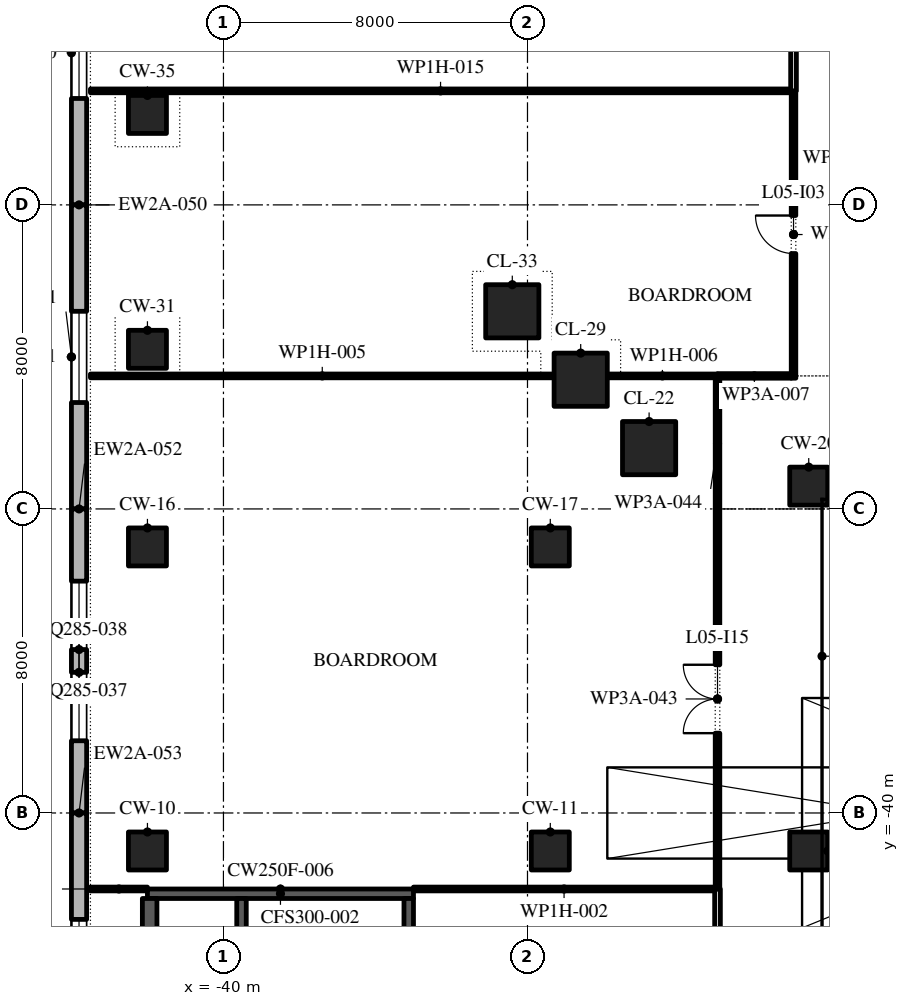
"""IFC4 building model, lengths in metres.
Left out: names, types, materials, properties, quantities, classifications, styles, units other than length and angle.
Written with IfcOpenShell. Run it as: python <this file> out.ifc"""

import sys

from ifc_helpers import new_model, si_unit, direction, frame, frame_2d, origin, origin_2d, place, context, subcontext, project, spatial, polyline, rectangle, outline, extrude, element, fill, save


model = new_model("IFC4")
c1 = context("Model", 3, precision=1e-05, world=origin(), true_north=direction((0.0, 1.0)))
c2 = subcontext(c1, "Body", "Model", "MODEL_VIEW")
j1 = project(units=[si_unit("LENGTHUNIT", "METRE"), si_unit("PLANEANGLEUNIT", "RADIAN")], contexts=[c1])
p1 = place(None, origin())
s1 = spatial("IfcSite", under=j1, at=p1, CompositionType="ELEMENT")
p2 = place(p1, origin())
s2 = spatial("IfcBuilding", under=s1, at=p2, CompositionType="ELEMENT")
p3 = place(p2, frame((0.0, 0.0, 28.8)))
s3 = spatial("IfcBuildingStorey", under=s2, at=p3, CompositionType="ELEMENT", Elevation=28.8)
for number, where, z_axis, x_axis in (
    (1, (-42.0, -41.0, 0.0), (0.0, 0.0, 1.0), (1.0, 0.0, 0.0)),
    (2, (-31.4, -41.0, 0.0), (0.0, 0.0, 1.0), (1.0, 0.0, 0.0)),
    (3, (-24.6, -41.0, 0.0), (0.0, 0.0, 1.0), (1.0, 0.0, 0.0)),
    (4, (-42.0, -33.0, 0.0), (0.0, 0.0, 1.0), (1.0, 0.0, 0.0)),
    (5, (-31.4, -33.0, 0.0), (0.0, 0.0, 1.0), (1.0, 0.0, 0.0)),
    (6, (-24.6, -31.4, 0.0), (0.0, 0.0, 1.0), (1.0, 0.0, 0.0)),
):
    element("IfcColumn", number, at=place(p3, frame(where, z_axis=z_axis, x_axis=x_axis)), inside=s3, PredefinedType="COLUMN", context=c2, shape_type="SweptSolid", body=[
        extrude(rectangle(XDim=1.0, YDim=1.0, at=origin_2d()), origin(), (0.0, 0.0, 1.0), 4.35),
    ])
for number, where, z_axis, x_axis in (
    (7, (-28.8, -30.4, 0.0), (0.0, 0.0, 1.0), (1.0, 0.0, 0.0)),
    (8, (-30.6, -28.6, 0.0), (0.0, 0.0, 1.0), (1.0, 0.0, 0.0)),
):
    element("IfcColumn", number, at=place(p3, frame(where, z_axis=z_axis, x_axis=x_axis)), inside=s3, PredefinedType="COLUMN", context=c2, shape_type="SweptSolid", body=[
        extrude(rectangle(XDim=1.4, YDim=1.4, at=origin_2d()), origin(), (0.0, 0.0, 1.0), 4.8),
    ])
p4 = place(p3, frame((-42.0, -27.8, 0.0), z_axis=(0.0, 0.0, 1.0), x_axis=(1.0, 0.0, 0.0)))
e9 = element("IfcColumn", 9, at=p4, inside=s3, PredefinedType="COLUMN", context=c2, shape_type="SweptSolid", body=[
    extrude(rectangle(XDim=1.0, YDim=1.0, at=origin_2d()), origin(), (0.0, 0.0, 1.0), 4.35),
])
p5 = place(p3, frame((-32.4, -26.8, 0.0), z_axis=(0.0, 0.0, 1.0), x_axis=(1.0, 0.0, 0.0)))
e10 = element("IfcColumn", 10, at=p5, inside=s3, PredefinedType="COLUMN", context=c2, shape_type="SweptSolid", body=[
    extrude(rectangle(XDim=1.4, YDim=1.4, at=origin_2d()), origin(), (0.0, 0.0, 1.0), 4.8),
])
p6 = place(p3, frame((-42.0, -21.62, 0.0), z_axis=(0.0, 0.0, 1.0), x_axis=(1.0, 0.0, 0.0)))
e11 = element("IfcColumn", 11, at=p6, inside=s3, PredefinedType="COLUMN", context=c2, shape_type="SweptSolid", body=[
    extrude(rectangle(XDim=1.0, YDim=1.0, at=origin_2d()), origin(), (0.0, 0.0, 1.0), 4.35),
])
p7 = place(p3, frame((-43.8, -16.0, 0.0), z_axis=(0.0, 0.0, 1.0), x_axis=(0.0, -1.0, 0.0)))
e12 = element("IfcWall", 12, at=p7, inside=s3, PredefinedType="STANDARD", context=c2, shape_type="SweptSolid", body=[
    extrude(rectangle(XDim=8.0, YDim=0.4, at=frame_2d((4.0, 0.0))), origin(), (0.0, 0.0, 1.0), 4.35),
])
p8 = place(p7, frame((2.8, 0.0, 0.9)))
e13 = element("IfcOpeningElement", 13, at=p8, cuts=e12, PredefinedType="OPENING", context=c2, shape_type="SweptSolid", body=[
    extrude(outline(polyline([(0.0, 0.0), (2.4, 0.0), (2.4, 1.425), (2.378, 1.677), (2.312, 1.921), (2.205, 2.15), (2.06, 2.356), (1.881, 2.535), (1.674, 2.679), (1.444, 2.785), (1.2, 2.85), (0.956, 2.785), (0.726, 2.679), (0.519, 2.535), (0.34, 2.356), (0.195, 2.15), (0.088, 1.921), (0.022, 1.677), (0.0, 1.425), (0.0, 0.0)])), frame((0.0, 0.21, 0.0), z_axis=(0.0, -1.0, 0.0), x_axis=(1.0, 0.0, 0.0)), (0.0, 0.0, 1.0), 0.42),
])
p9 = place(p3, frame((-43.8, -24.0, 0.0), z_axis=(0.0, 0.0, 1.0), x_axis=(0.0, -1.0, 0.0)))
e14 = element("IfcWall", 14, at=p9, inside=s3, PredefinedType="STANDARD", context=c2, shape_type="SweptSolid", body=[
    extrude(rectangle(XDim=8.0, YDim=0.4, at=frame_2d((4.0, 0.0))), origin(), (0.0, 0.0, 1.0), 4.35),
])
p10 = place(p9, frame((2.8, 0.0, 0.9)))
e15 = element("IfcOpeningElement", 15, at=p10, cuts=e14, PredefinedType="OPENING", context=c2, shape_type="SweptSolid", body=[
    extrude(outline(polyline([(0.0, 0.0), (2.4, 0.0), (2.4, 1.425), (2.378, 1.677), (2.312, 1.921), (2.205, 2.15), (2.06, 2.356), (1.881, 2.535), (1.674, 2.679), (1.444, 2.785), (1.2, 2.85), (0.956, 2.785), (0.726, 2.679), (0.519, 2.535), (0.34, 2.356), (0.195, 2.15), (0.088, 1.921), (0.022, 1.677), (0.0, 1.425), (0.0, 0.0)])), frame((0.0, 0.21, 0.0), z_axis=(0.0, -1.0, 0.0), x_axis=(1.0, 0.0, 0.0)), (0.0, 0.0, 1.0), 0.42),
])
p11 = place(p3, frame((-43.8, -32.0, 0.0), z_axis=(0.0, 0.0, 1.0), x_axis=(0.0, -1.0, 0.0)))
e16 = element("IfcWall", 16, at=p11, inside=s3, PredefinedType="STANDARD", context=c2, shape_type="SweptSolid", body=[
    extrude(rectangle(XDim=8.0, YDim=0.4, at=frame_2d((4.0, 0.0))), origin(), (0.0, 0.0, 1.0), 4.35),
])
p12 = place(p11, frame((1.9, 0.0, 0.9)))
e17 = element("IfcOpeningElement", 17, at=p12, cuts=e16, PredefinedType="OPENING", context=c2, shape_type="SweptSolid", body=[
    extrude(outline(polyline([(0.0, 0.0), (1.8, 0.0), (1.8, 1.425), (1.784, 1.646), (1.738, 1.864), (1.661, 2.072), (1.556, 2.268), (1.425, 2.447), (1.269, 2.605), (1.093, 2.741), (0.9, 2.85), (0.707, 2.741), (0.531, 2.605), (0.375, 2.447), (0.244, 2.268), (0.139, 2.072), (0.062, 1.864), (0.016, 1.646), (0.0, 1.425), (0.0, 0.0)])), frame((0.0, 0.21, 0.0), z_axis=(0.0, -1.0, 0.0), x_axis=(1.0, 0.0, 0.0)), (0.0, 0.0, 1.0), 0.42),
])
p13 = place(p11, frame((4.3, 0.0, 0.9)))
e18 = element("IfcOpeningElement", 18, at=p13, cuts=e16, PredefinedType="OPENING", context=c2, shape_type="SweptSolid", body=[
    extrude(outline(polyline([(0.0, 0.0), (1.8, 0.0), (1.8, 1.425), (1.784, 1.646), (1.738, 1.864), (1.661, 2.072), (1.556, 2.268), (1.425, 2.447), (1.269, 2.605), (1.093, 2.741), (0.9, 2.85), (0.707, 2.741), (0.531, 2.605), (0.375, 2.447), (0.244, 2.268), (0.139, 2.072), (0.062, 1.864), (0.016, 1.646), (0.0, 1.425), (0.0, 0.0)])), frame((0.0, 0.21, 0.0), z_axis=(0.0, -1.0, 0.0), x_axis=(1.0, 0.0, 0.0)), (0.0, 0.0, 1.0), 0.42),
])
p14 = place(p3, frame((-43.8, -40.0, 0.0), z_axis=(0.0, 0.0, 1.0), x_axis=(0.0, -1.0, 0.0)))
e19 = element("IfcWall", 19, at=p14, inside=s3, PredefinedType="STANDARD", context=c2, shape_type="SweptSolid", body=[
    extrude(rectangle(XDim=8.0, YDim=0.4, at=frame_2d((4.0, 0.0))), origin(), (0.0, 0.0, 1.0), 4.35),
])
p15 = place(p14, frame((2.8, 0.0, 0.9)))
e20 = element("IfcOpeningElement", 20, at=p15, cuts=e19, PredefinedType="OPENING", context=c2, shape_type="SweptSolid", body=[
    extrude(outline(polyline([(0.0, 0.0), (2.4, 0.0), (2.4, 1.425), (2.378, 1.677), (2.312, 1.921), (2.205, 2.15), (2.06, 2.356), (1.881, 2.535), (1.674, 2.679), (1.444, 2.785), (1.2, 2.85), (0.956, 2.785), (0.726, 2.679), (0.519, 2.535), (0.34, 2.356), (0.195, 2.15), (0.088, 1.921), (0.022, 1.677), (0.0, 1.425), (0.0, 0.0)])), frame((0.0, 0.21, 0.0), z_axis=(0.0, -1.0, 0.0), x_axis=(1.0, 0.0, 0.0)), (0.0, 0.0, 1.0), 0.42),
])
p16 = place(p3, frame((-42.0, -42.125, 0.0), z_axis=(0.0, 0.0, 1.0), x_axis=(1.0, 0.0, 0.0)))
e21 = element("IfcWall", 21, at=p16, inside=s3, PredefinedType="SHEAR", context=c2, shape_type="SweptSolid", body=[
    extrude(rectangle(XDim=7.0, YDim=0.25, at=frame_2d((3.5, 0.0))), origin(), (0.0, 0.0, 1.0), 4.35),
])
p17 = place(p3, frame((-41.942, -49.5, 0.0), z_axis=(0.0, 0.0, 1.0), x_axis=(0.0, 1.0, 0.0)))
e22 = element("IfcWall", 22, at=p17, inside=s3, PredefinedType="SHEAR", context=c2, shape_type="SweptSolid", body=[
    extrude(rectangle(XDim=7.25, YDim=0.384, at=frame_2d((3.625, 0.0))), origin(), (0.0, 0.0, 1.0), 4.35),
])
p18 = place(p17, frame((3.05, 0.0, 0.0)))
e23 = element("IfcOpeningElement", 23, at=p18, cuts=e22, PredefinedType="OPENING", context=c2, shape_type="SweptSolid", body=[
    extrude(rectangle(XDim=0.9, YDim=2.1, at=frame_2d((0.45, 1.05))), frame((0.0, 0.202, 0.0), z_axis=(0.0, -1.0, 0.0), x_axis=(1.0, 0.0, 0.0)), (0.0, 0.0, 1.0), 0.404),
])
p19 = place(p3, frame((-35.125, -49.75, 0.0), z_axis=(0.0, 0.0, 1.0), x_axis=(0.0, 1.0, 0.0)))
e24 = element("IfcWall", 24, at=p19, inside=s3, PredefinedType="SHEAR", context=c2, shape_type="SweptSolid", body=[
    extrude(rectangle(XDim=7.5, YDim=0.25, at=frame_2d((3.75, 0.0))), origin(), (0.0, 0.0, 1.0), 4.35),
])
p20 = place(p19, frame((0.6, 0.0, 0.0)))
e25 = element("IfcOpeningElement", 25, at=p20, cuts=e24, PredefinedType="OPENING", context=c2, shape_type="SweptSolid", body=[
    extrude(rectangle(XDim=1.2, YDim=2.1, at=frame_2d((0.6, 1.05))), frame((0.0, 0.135, 0.0), z_axis=(0.0, -1.0, 0.0), x_axis=(1.0, 0.0, 0.0)), (0.0, 0.0, 1.0), 0.27),
])
p21 = place(p3, frame((-39.525, -49.75, 0.0), z_axis=(0.0, 0.0, 1.0), x_axis=(0.0, 1.0, 0.0)))
e26 = element("IfcWall", 26, at=p21, inside=s3, PredefinedType="SHEAR", context=c2, shape_type="SweptSolid", body=[
    extrude(rectangle(XDim=7.5, YDim=0.25, at=frame_2d((3.75, 0.0))), origin(), (0.0, 0.0, 1.0), 4.35),
])
p22 = place(p3, frame((-43.5, -42.0, 0.0), z_axis=(0.0, 0.0, 1.0), x_axis=(1.0, 0.0, 0.0)))
e27 = element("IfcWall", 27, at=p22, inside=s3, PredefinedType="PARTITIONING", context=c2, shape_type="SweptSolid", body=[
    extrude(rectangle(XDim=1.5, YDim=0.1, at=frame_2d((0.75, 0.0))), origin(), (0.0, 0.0, 1.0), 4.35),
])
p23 = place(p3, frame((-35.0, -42.0, 0.0), z_axis=(0.0, 0.0, 1.0), x_axis=(1.0, 0.0, 0.0)))
e28 = element("IfcWall", 28, at=p23, inside=s3, PredefinedType="PARTITIONING", context=c2, shape_type="SweptSolid", body=[
    extrude(rectangle(XDim=7.925, YDim=0.1, at=frame_2d((3.962, 0.0))), origin(), (0.0, 0.0, 1.0), 4.35),
])
p24 = place(p3, frame((-43.5, -28.5, 0.0), z_axis=(0.0, 0.0, 1.0), x_axis=(1.0, 0.0, 0.0)))
e29 = element("IfcWall", 29, at=p24, inside=s3, PredefinedType="PARTITIONING", context=c2, shape_type="SweptSolid", body=[
    extrude(rectangle(XDim=12.2, YDim=0.1, at=frame_2d((6.1, 0.0))), origin(), (0.0, 0.0, 1.0), 4.35),
])
p25 = place(p3, frame((-29.9, -28.5, 0.0), z_axis=(0.0, 0.0, 1.0), x_axis=(1.0, 0.0, 0.0)))
e30 = element("IfcWall", 30, at=p25, inside=s3, PredefinedType="PARTITIONING", context=c2, shape_type="SweptSolid", body=[
    extrude(rectangle(XDim=2.9, YDim=0.1, at=frame_2d((1.45, 0.0))), origin(), (0.0, 0.0, 1.0), 4.35),
])
p26 = place(p3, frame((-27.0, -28.5, 0.0), z_axis=(0.0, 0.0, 1.0), x_axis=(1.0, 0.0, 0.0)))
e31 = element("IfcWall", 31, at=p26, inside=s3, PredefinedType="PARTITIONING", context=c2, shape_type="SweptSolid", body=[
    extrude(rectangle(XDim=1.94, YDim=0.12, at=frame_2d((0.97, 0.0))), origin(), (0.0, 0.0, 1.0), 4.35),
])
p27 = place(p3, frame((-43.5, -21.0, 0.0), z_axis=(0.0, 0.0, 1.0), x_axis=(1.0, 0.0, 0.0)))
e32 = element("IfcWall", 32, at=p27, inside=s3, PredefinedType="PARTITIONING", context=c2, shape_type="SweptSolid", body=[
    extrude(rectangle(XDim=18.425, YDim=0.1, at=frame_2d((9.212, 0.0))), origin(), (0.0, 0.0, 1.0), 4.35),
])
p28 = place(p3, frame((-27.0, -48.0, 0.0), z_axis=(0.0, 0.0, 1.0), x_axis=(0.0, 1.0, 0.0)))
e33 = element("IfcWall", 33, at=p28, inside=s3, PredefinedType="PARTITIONING", context=c2, shape_type="SweptSolid", body=[
    extrude(rectangle(XDim=6.0, YDim=0.15, at=frame_2d((3.0, 0.0))), origin(), (0.0, 0.0, 1.0), 4.35),
])
p29 = place(p28, frame((2.5, 0.0, 0.0)))
e34 = element("IfcOpeningElement", 34, at=p29, cuts=e33, PredefinedType="OPENING", context=c2, shape_type="SweptSolid", body=[
    extrude(rectangle(XDim=1.0, YDim=2.1, at=frame_2d((0.5, 1.05))), frame((0.0, 0.085, 0.0), z_axis=(0.0, -1.0, 0.0), x_axis=(1.0, 0.0, 0.0)), (0.0, 0.0, 1.0), 0.17),
])
p30 = place(p3, frame((-27.0, -42.0, 0.0), z_axis=(0.0, 0.0, 1.0), x_axis=(0.0, 1.0, 0.0)))
e35 = element("IfcWall", 35, at=p30, inside=s3, PredefinedType="PARTITIONING", context=c2, shape_type="SweptSolid", body=[
    extrude(rectangle(XDim=10.0, YDim=0.12, at=frame_2d((5.0, 0.0))), origin(), (0.0, 0.0, 1.0), 4.35),
])
p31 = place(p30, frame((4.1, 0.0, 0.0)))
e36 = element("IfcOpeningElement", 36, at=p31, cuts=e35, PredefinedType="OPENING", context=c2, shape_type="SweptSolid", body=[
    extrude(rectangle(XDim=1.8, YDim=2.1, at=frame_2d((0.9, 1.05))), frame((0.0, 0.07, 0.0), z_axis=(0.0, -1.0, 0.0), x_axis=(1.0, 0.0, 0.0)), (0.0, 0.0, 1.0), 0.14),
])
p32 = place(p3, frame((-27.0, -32.0, 0.0), z_axis=(0.0, 0.0, 1.0), x_axis=(0.0, 1.0, 0.0)))
e37 = element("IfcWall", 37, at=p32, inside=s3, PredefinedType="PARTITIONING", context=c2, shape_type="SweptSolid", body=[
    extrude(rectangle(XDim=3.44, YDim=0.12, at=frame_2d((1.72, 0.0))), origin(), (0.0, 0.0, 1.0), 4.35),
])
p33 = place(p3, frame((-25.0, -28.56, 0.0), z_axis=(0.0, 0.0, 1.0), x_axis=(0.0, 1.0, 0.0)))
e38 = element("IfcWall", 38, at=p33, inside=s3, PredefinedType="PARTITIONING", context=c2, shape_type="SweptSolid", body=[
    extrude(rectangle(XDim=7.56, YDim=0.12, at=frame_2d((3.78, 0.0))), origin(), (0.0, 0.0, 1.0), 4.35),
])
p34 = place(p33, frame((3.28, 0.0, 0.0)))
e39 = element("IfcOpeningElement", 39, at=p34, cuts=e38, PredefinedType="OPENING", context=c2, shape_type="SweptSolid", body=[
    extrude(rectangle(XDim=1.0, YDim=2.1, at=frame_2d((0.5, 1.05))), frame((0.0, 0.07, 0.0), z_axis=(0.0, -1.0, 0.0), x_axis=(1.0, 0.0, 0.0)), (0.0, 0.0, 1.0), 0.14),
])
p35 = place(p3, frame((-25.0, -21.0, 0.0), z_axis=(0.0, 0.0, 1.0), x_axis=(0.0, 1.0, 0.0)))
e40 = element("IfcWall", 40, at=p35, inside=s3, PredefinedType="PARTITIONING", context=c2, shape_type="SweptSolid", body=[
    extrude(rectangle(XDim=10.0, YDim=0.15, at=frame_2d((5.0, 0.0))), origin(), (0.0, 0.0, 1.0), 4.35),
])
p36 = place(p35, frame((4.1, 0.0, 0.0)))
e41 = element("IfcOpeningElement", 41, at=p36, cuts=e40, PredefinedType="OPENING", context=c2, shape_type="SweptSolid", body=[
    extrude(rectangle(XDim=1.8, YDim=2.1, at=frame_2d((0.9, 1.05))), frame((0.0, 0.085, 0.0), z_axis=(0.0, -1.0, 0.0), x_axis=(1.0, 0.0, 0.0)), (0.0, 0.0, 1.0), 0.17),
])
p37 = place(p8, origin())
e42 = element("IfcWindow", 42, at=p37, inside=s3, PartitioningType="DOUBLE_PANEL_VERTICAL", PredefinedType="WINDOW", context=c2, shape_type="SweptSolid", body=[
    extrude(outline(polyline([(0.0, 0.0), (2.4, 0.0), (2.4, 1.425), (2.378, 1.677), (2.312, 1.921), (2.205, 2.15), (2.06, 2.356), (1.881, 2.535), (1.674, 2.679), (1.444, 2.785), (1.2, 2.85), (0.956, 2.785), (0.726, 2.679), (0.519, 2.535), (0.34, 2.356), (0.195, 2.15), (0.088, 1.921), (0.022, 1.677), (0.0, 1.425), (0.0, 0.0)])), frame((0.0, 0.03, 0.0), z_axis=(0.0, -1.0, 0.0), x_axis=(1.0, 0.0, 0.0)), (0.0, 0.0, 1.0), 0.06),
])
fill(e13, e42)
p38 = place(p10, origin())
e43 = element("IfcWindow", 43, at=p38, inside=s3, PartitioningType="DOUBLE_PANEL_VERTICAL", PredefinedType="WINDOW", context=c2, shape_type="SweptSolid", body=[
    extrude(outline(polyline([(0.0, 0.0), (2.4, 0.0), (2.4, 1.425), (2.378, 1.677), (2.312, 1.921), (2.205, 2.15), (2.06, 2.356), (1.881, 2.535), (1.674, 2.679), (1.444, 2.785), (1.2, 2.85), (0.956, 2.785), (0.726, 2.679), (0.519, 2.535), (0.34, 2.356), (0.195, 2.15), (0.088, 1.921), (0.022, 1.677), (0.0, 1.425), (0.0, 0.0)])), frame((0.0, 0.03, 0.0), z_axis=(0.0, -1.0, 0.0), x_axis=(1.0, 0.0, 0.0)), (0.0, 0.0, 1.0), 0.06),
])
fill(e15, e43)
p39 = place(p12, origin())
e44 = element("IfcWindow", 44, at=p39, inside=s3, PartitioningType="DOUBLE_PANEL_VERTICAL", PredefinedType="WINDOW", context=c2, shape_type="SweptSolid", body=[
    extrude(outline(polyline([(0.0, 0.0), (1.8, 0.0), (1.8, 1.425), (1.784, 1.646), (1.738, 1.864), (1.661, 2.072), (1.556, 2.268), (1.425, 2.447), (1.269, 2.605), (1.093, 2.741), (0.9, 2.85), (0.707, 2.741), (0.531, 2.605), (0.375, 2.447), (0.244, 2.268), (0.139, 2.072), (0.062, 1.864), (0.016, 1.646), (0.0, 1.425), (0.0, 0.0)])), frame((0.0, 0.03, 0.0), z_axis=(0.0, -1.0, 0.0), x_axis=(1.0, 0.0, 0.0)), (0.0, 0.0, 1.0), 0.06),
])
fill(e17, e44)
p40 = place(p13, origin())
e45 = element("IfcWindow", 45, at=p40, inside=s3, PartitioningType="DOUBLE_PANEL_VERTICAL", PredefinedType="WINDOW", context=c2, shape_type="SweptSolid", body=[
    extrude(outline(polyline([(0.0, 0.0), (1.8, 0.0), (1.8, 1.425), (1.784, 1.646), (1.738, 1.864), (1.661, 2.072), (1.556, 2.268), (1.425, 2.447), (1.269, 2.605), (1.093, 2.741), (0.9, 2.85), (0.707, 2.741), (0.531, 2.605), (0.375, 2.447), (0.244, 2.268), (0.139, 2.072), (0.062, 1.864), (0.016, 1.646), (0.0, 1.425), (0.0, 0.0)])), frame((0.0, 0.03, 0.0), z_axis=(0.0, -1.0, 0.0), x_axis=(1.0, 0.0, 0.0)), (0.0, 0.0, 1.0), 0.06),
])
fill(e18, e45)
p41 = place(p15, origin())
e46 = element("IfcWindow", 46, at=p41, inside=s3, PartitioningType="DOUBLE_PANEL_VERTICAL", PredefinedType="WINDOW", context=c2, shape_type="SweptSolid", body=[
    extrude(outline(polyline([(0.0, 0.0), (2.4, 0.0), (2.4, 1.425), (2.378, 1.677), (2.312, 1.921), (2.205, 2.15), (2.06, 2.356), (1.881, 2.535), (1.674, 2.679), (1.444, 2.785), (1.2, 2.85), (0.956, 2.785), (0.726, 2.679), (0.519, 2.535), (0.34, 2.356), (0.195, 2.15), (0.088, 1.921), (0.022, 1.677), (0.0, 1.425), (0.0, 0.0)])), frame((0.0, 0.03, 0.0), z_axis=(0.0, -1.0, 0.0), x_axis=(1.0, 0.0, 0.0)), (0.0, 0.0, 1.0), 0.06),
])
fill(e20, e46)
p42 = place(p34, origin())
e47 = element("IfcDoor", 47, at=p42, inside=s3, OperationType="SINGLE_SWING_LEFT", PredefinedType="DOOR", context=c2, shape_type="SweptSolid", body=[
    extrude(rectangle(XDim=1.0, YDim=2.1, at=frame_2d((0.5, 1.05))), frame((0.0, 0.025, 0.0), z_axis=(0.0, -1.0, 0.0), x_axis=(1.0, 0.0, 0.0)), (0.0, 0.0, 1.0), 0.05),
])
fill(e39, e47)
p43 = place(p31, origin())
e48 = element("IfcDoor", 48, at=p43, inside=s3, OperationType="SINGLE_SWING_LEFT", PredefinedType="DOOR", context=c2, shape_type="SweptSolid", body=[
    extrude(rectangle(XDim=1.8, YDim=2.1, at=frame_2d((0.9, 1.05))), frame((0.0, 0.025, 0.0), z_axis=(0.0, -1.0, 0.0), x_axis=(1.0, 0.0, 0.0)), (0.0, 0.0, 1.0), 0.05),
])
fill(e36, e48)
save(model, sys.argv[1])
